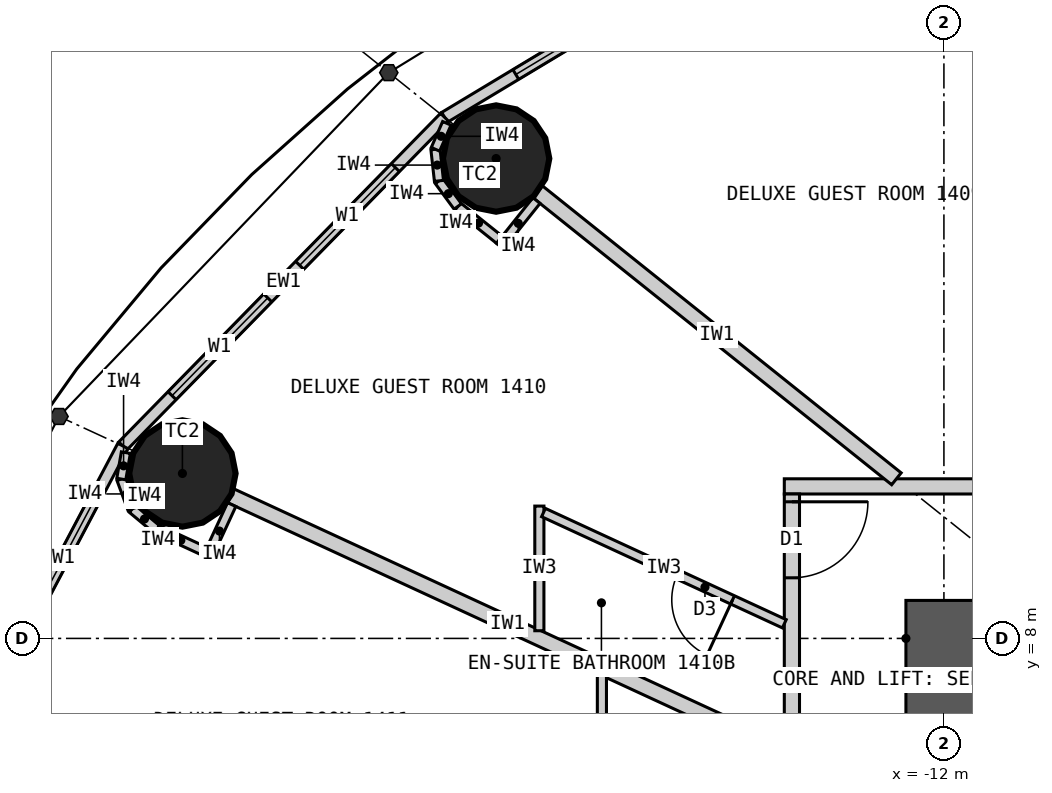
"""IFC4 building model, lengths in metres.
Left out: names, types, materials, properties, quantities, classifications, styles, units other than length and angle.
Written with IfcOpenShell. Run it as: python <this file> out.ifc"""

import sys

from ifc_helpers import new_model, si_unit, direction, frame, frame_2d, origin, origin_2d, place, context, subcontext, project, spatial, rectangle, circle, extrude, element, fill, save


model = new_model("IFC4")
c1 = context("Model", 3, precision=1e-05, world=origin(), true_north=direction((0.0, 1.0)))
c2 = subcontext(c1, "Body", "Model", "MODEL_VIEW")
j1 = project(units=[si_unit("LENGTHUNIT", "METRE"), si_unit("PLANEANGLEUNIT", "RADIAN")], contexts=[c1])
p1 = place(None, origin())
s1 = spatial("IfcSite", under=j1, at=p1, CompositionType="ELEMENT")
p2 = place(p1, origin())
s2 = spatial("IfcBuilding", under=s1, at=p2, CompositionType="ELEMENT")
p3 = place(p2, frame((0.0, 0.0, 60.6)))
s3 = spatial("IfcBuildingStorey", under=s2, at=p3, CompositionType="ELEMENT", Elevation=60.6)
for number, where, z_axis, x_axis in (
    (1, (-17.892, 14.313, 0.0), (0.0, 0.0, 1.0), (1.0, 0.0, 0.0)),
    (2, (-22.019, 10.17, 0.0), (0.0, 0.0, 1.0), (1.0, 0.0, 0.0)),
):
    element("IfcColumn", number, at=place(p3, frame(where, z_axis=z_axis, x_axis=x_axis)), inside=s3, PredefinedType="COLUMN", context=c2, shape_type="SweptSolid", body=[
        extrude(circle(Radius=0.7, at=origin_2d()), origin(), (0.0, 0.0, 1.0), 3.3),
    ])
p4 = place(p3, frame((-12.5, 8.0, 0.0), z_axis=(0.0, 0.0, 1.0), x_axis=(1.0, 0.0, 0.0)))
e3 = element("IfcWall", 3, at=p4, inside=s3, PredefinedType="SHEAR", context=c2, shape_type="SweptSolid", body=[
    extrude(rectangle(XDim=25.0, YDim=1.0, at=frame_2d((12.5, 0.0))), origin(), (0.0, 0.0, 1.0), 3.3),
])
p5 = place(p4, frame((11.2, 0.0, 0.0)))
e4 = element("IfcOpeningElement", 4, at=p5, cuts=e3, PredefinedType="OPENING", context=c2, shape_type="SweptSolid", body=[
    extrude(rectangle(XDim=1.2, YDim=2.2, at=frame_2d((0.6, 1.1))), frame((0.0, 0.51, 0.0), z_axis=(0.0, -1.0, 0.0), x_axis=(1.0, 0.0, 0.0)), (0.0, 0.0, 1.0), 1.02),
])
p6 = place(p4, frame((18.8, 0.0, 0.0)))
e5 = element("IfcOpeningElement", 5, at=p6, cuts=e3, PredefinedType="OPENING", context=c2, shape_type="SweptSolid", body=[
    extrude(rectangle(XDim=0.9, YDim=2.2, at=frame_2d((0.45, 1.1))), frame((0.0, 0.51, 0.0), z_axis=(0.0, -1.0, 0.0), x_axis=(1.0, 0.0, 0.0)), (0.0, 0.0, 1.0), 1.02),
])
p7 = place(p3, frame((-12.0, 7.5, 0.0), z_axis=(0.0, 0.0, 1.0), x_axis=(0.0, -1.0, 0.0)))
e6 = element("IfcWall", 6, at=p7, inside=s3, PredefinedType="SHEAR", context=c2, shape_type="SweptSolid", body=[
    extrude(rectangle(XDim=15.0, YDim=1.0, at=frame_2d((7.5, 0.0))), origin(), (0.0, 0.0, 1.0), 3.3),
])
p8 = place(p7, frame((6.6, 0.0, 0.0)))
e7 = element("IfcOpeningElement", 7, at=p8, cuts=e6, PredefinedType="OPENING", context=c2, shape_type="SweptSolid", body=[
    extrude(rectangle(XDim=1.8, YDim=2.2, at=frame_2d((0.9, 1.1))), frame((0.0, 0.51, 0.0), z_axis=(0.0, -1.0, 0.0), x_axis=(1.0, 0.0, 0.0)), (0.0, 0.0, 1.0), 1.02),
])
p9 = place(p3, frame((-13.096, 18.147, 0.0), z_axis=(0.0, 0.0, 1.0), x_axis=(-0.856983180864, -0.515344377787, 0.0)))
e8 = element("IfcWall", 8, at=p9, inside=s3, PredefinedType="ELEMENTEDWALL", context=c2, shape_type="SweptSolid", body=[
    extrude(rectangle(XDim=6.386, YDim=0.15, at=frame_2d((3.193, 0.0))), origin(), (0.0, 0.0, 1.0), 3.12),
])
p10 = place(p9, frame((1.093, 0.0, 0.9)))
e9 = element("IfcOpeningElement", 9, at=p10, cuts=e8, PredefinedType="OPENING", context=c2, shape_type="SweptSolid", body=[
    extrude(rectangle(XDim=1.8, YDim=1.9, at=frame_2d((0.9, 0.95))), frame((0.0, 0.085, 0.0), z_axis=(0.0, -1.0, 0.0), x_axis=(1.0, 0.0, 0.0)), (0.0, 0.0, 1.0), 0.17),
])
p11 = place(p9, frame((3.493, 0.0, 0.9)))
e10 = element("IfcOpeningElement", 10, at=p11, cuts=e8, PredefinedType="OPENING", context=c2, shape_type="SweptSolid", body=[
    extrude(rectangle(XDim=1.8, YDim=1.9, at=frame_2d((0.9, 0.95))), frame((0.0, 0.085, 0.0), z_axis=(0.0, -1.0, 0.0), x_axis=(1.0, 0.0, 0.0)), (0.0, 0.0, 1.0), 0.17),
])
p12 = place(p3, frame((-18.57, 14.856, 0.0), z_axis=(0.0, 0.0, 1.0), x_axis=(-0.699602905915, -0.714531856557, 0.0)))
e11 = element("IfcWall", 11, at=p12, inside=s3, PredefinedType="ELEMENTEDWALL", context=c2, shape_type="SweptSolid", body=[
    extrude(rectangle(XDim=6.051, YDim=0.15, at=frame_2d((3.025, 0.0))), origin(), (0.0, 0.0, 1.0), 3.12),
])
p13 = place(p12, frame((0.926, 0.0, 0.9)))
e12 = element("IfcOpeningElement", 12, at=p13, cuts=e11, PredefinedType="OPENING", context=c2, shape_type="SweptSolid", body=[
    extrude(rectangle(XDim=1.8, YDim=1.9, at=frame_2d((0.9, 0.95))), frame((0.0, 0.085, 0.0), z_axis=(0.0, -1.0, 0.0), x_axis=(1.0, 0.0, 0.0)), (0.0, 0.0, 1.0), 0.17),
])
p14 = place(p12, frame((3.325, 0.0, 0.9)))
e13 = element("IfcOpeningElement", 13, at=p14, cuts=e11, PredefinedType="OPENING", context=c2, shape_type="SweptSolid", body=[
    extrude(rectangle(XDim=1.8, YDim=1.9, at=frame_2d((0.9, 0.95))), frame((0.0, 0.085, 0.0), z_axis=(0.0, -1.0, 0.0), x_axis=(1.0, 0.0, 0.0)), (0.0, 0.0, 1.0), 0.17),
])
p15 = place(p3, frame((-22.803, 10.532, 0.0), z_axis=(0.0, 0.0, 1.0), x_axis=(-0.467296867008, -0.884100468321, 0.0)))
e14 = element("IfcWall", 14, at=p15, inside=s3, PredefinedType="ELEMENTEDWALL", context=c2, shape_type="SweptSolid", body=[
    extrude(rectangle(XDim=5.734, YDim=0.15, at=frame_2d((2.867, 0.0))), origin(), (0.0, 0.0, 1.0), 3.12),
])
p16 = place(p15, frame((0.767, 0.0, 0.9)))
e15 = element("IfcOpeningElement", 15, at=p16, cuts=e14, PredefinedType="OPENING", context=c2, shape_type="SweptSolid", body=[
    extrude(rectangle(XDim=1.8, YDim=1.9, at=frame_2d((0.9, 0.95))), frame((0.0, 0.085, 0.0), z_axis=(0.0, -1.0, 0.0), x_axis=(1.0, 0.0, 0.0)), (0.0, 0.0, 1.0), 0.17),
])
p17 = place(p15, frame((3.167, 0.0, 0.9)))
e16 = element("IfcOpeningElement", 16, at=p17, cuts=e14, PredefinedType="OPENING", context=c2, shape_type="SweptSolid", body=[
    extrude(rectangle(XDim=1.8, YDim=1.9, at=frame_2d((0.9, 0.95))), frame((0.0, 0.085, 0.0), z_axis=(0.0, -1.0, 0.0), x_axis=(1.0, 0.0, 0.0)), (0.0, 0.0, 1.0), 0.17),
])
p18 = place(p3, frame((-14.1, 10.0, 0.0), z_axis=(0.0, 0.0, 1.0), x_axis=(1.0, 0.0, 0.0)))
e17 = element("IfcWall", 17, at=p18, inside=s3, PredefinedType="PARTITIONING", context=c2, shape_type="SweptSolid", body=[
    extrude(rectangle(XDim=28.2, YDim=0.2, at=frame_2d((14.1, 0.0))), origin(), (0.0, 0.0, 1.0), 3.12),
])
p19 = place(p18, frame((18.529, 0.0, 0.0)))
e18 = element("IfcOpeningElement", 18, at=p19, cuts=e17, PredefinedType="OPENING", context=c2, shape_type="SweptSolid", body=[
    extrude(rectangle(XDim=1.0, YDim=2.2, at=frame_2d((0.5, 1.1))), frame((0.0, 0.11, 0.0), z_axis=(0.0, -1.0, 0.0), x_axis=(1.0, 0.0, 0.0)), (0.0, 0.0, 1.0), 0.22),
])
p20 = place(p18, frame((14.623, 0.0, 0.0)))
e19 = element("IfcOpeningElement", 19, at=p20, cuts=e17, PredefinedType="OPENING", context=c2, shape_type="SweptSolid", body=[
    extrude(rectangle(XDim=1.0, YDim=2.2, at=frame_2d((0.5, 1.1))), frame((0.0, 0.11, 0.0), z_axis=(0.0, -1.0, 0.0), x_axis=(1.0, 0.0, 0.0)), (0.0, 0.0, 1.0), 0.22),
])
p21 = place(p18, frame((11.24, 0.0, 0.0)))
e20 = element("IfcOpeningElement", 20, at=p21, cuts=e17, PredefinedType="OPENING", context=c2, shape_type="SweptSolid", body=[
    extrude(rectangle(XDim=1.0, YDim=2.2, at=frame_2d((0.5, 1.1))), frame((0.0, 0.11, 0.0), z_axis=(0.0, -1.0, 0.0), x_axis=(1.0, 0.0, 0.0)), (0.0, 0.0, 1.0), 0.22),
])
p22 = place(p18, frame((8.671, 0.0, 0.0)))
e21 = element("IfcOpeningElement", 21, at=p22, cuts=e17, PredefinedType="OPENING", context=c2, shape_type="SweptSolid", body=[
    extrude(rectangle(XDim=1.0, YDim=2.2, at=frame_2d((0.5, 1.1))), frame((0.0, 0.11, 0.0), z_axis=(0.0, -1.0, 0.0), x_axis=(1.0, 0.0, 0.0)), (0.0, 0.0, 1.0), 0.22),
])
p23 = place(p18, frame((2.801, 0.0, 0.0)))
e22 = element("IfcOpeningElement", 22, at=p23, cuts=e17, PredefinedType="OPENING", context=c2, shape_type="SweptSolid", body=[
    extrude(rectangle(XDim=1.0, YDim=2.2, at=frame_2d((0.5, 1.1))), frame((0.0, 0.11, 0.0), z_axis=(0.0, -1.0, 0.0), x_axis=(1.0, 0.0, 0.0)), (0.0, 0.0, 1.0), 0.22),
])
p24 = place(p3, frame((-14.0, 9.9, 0.0), z_axis=(0.0, 0.0, 1.0), x_axis=(0.0, -1.0, 0.0)))
e23 = element("IfcWall", 23, at=p24, inside=s3, PredefinedType="PARTITIONING", context=c2, shape_type="SweptSolid", body=[
    extrude(rectangle(XDim=19.8, YDim=0.2, at=frame_2d((9.9, 0.0))), origin(), (0.0, 0.0, 1.0), 3.12),
])
p25 = place(p24, frame((0.103, 0.0, 0.0)))
e24 = element("IfcOpeningElement", 24, at=p25, cuts=e23, PredefinedType="OPENING", context=c2, shape_type="SweptSolid", body=[
    extrude(rectangle(XDim=1.0, YDim=2.2, at=frame_2d((0.5, 1.1))), frame((0.0, 0.11, 0.0), z_axis=(0.0, -1.0, 0.0), x_axis=(1.0, 0.0, 0.0)), (0.0, 0.0, 1.0), 0.22),
])
p26 = place(p24, frame((5.248, 0.0, 0.0)))
e25 = element("IfcOpeningElement", 25, at=p26, cuts=e23, PredefinedType="OPENING", context=c2, shape_type="SweptSolid", body=[
    extrude(rectangle(XDim=1.0, YDim=2.2, at=frame_2d((0.5, 1.1))), frame((0.0, 0.11, 0.0), z_axis=(0.0, -1.0, 0.0), x_axis=(1.0, 0.0, 0.0)), (0.0, 0.0, 1.0), 0.22),
])
p27 = place(p24, frame((9.438, 0.0, 0.0)))
e26 = element("IfcOpeningElement", 26, at=p27, cuts=e23, PredefinedType="OPENING", context=c2, shape_type="SweptSolid", body=[
    extrude(rectangle(XDim=1.0, YDim=2.2, at=frame_2d((0.5, 1.1))), frame((0.0, 0.11, 0.0), z_axis=(0.0, -1.0, 0.0), x_axis=(1.0, 0.0, 0.0)), (0.0, 0.0, 1.0), 0.22),
])
p28 = place(p24, frame((13.942, 0.0, 0.0)))
e27 = element("IfcOpeningElement", 27, at=p28, cuts=e23, PredefinedType="OPENING", context=c2, shape_type="SweptSolid", body=[
    extrude(rectangle(XDim=1.0, YDim=2.2, at=frame_2d((0.5, 1.1))), frame((0.0, 0.11, 0.0), z_axis=(0.0, -1.0, 0.0), x_axis=(1.0, 0.0, 0.0)), (0.0, 0.0, 1.0), 0.22),
])
p29 = place(p24, frame((18.698, 0.0, 0.0)))
e28 = element("IfcOpeningElement", 28, at=p29, cuts=e23, PredefinedType="OPENING", context=c2, shape_type="SweptSolid", body=[
    extrude(rectangle(XDim=1.0, YDim=2.2, at=frame_2d((0.5, 1.1))), frame((0.0, 0.11, 0.0), z_axis=(0.0, -1.0, 0.0), x_axis=(1.0, 0.0, 0.0)), (0.0, 0.0, 1.0), 0.22),
])
p30 = place(p3, frame((-7.289, 10.1, 0.0), z_axis=(0.0, 0.0, 1.0), x_axis=(-0.585198353053, 0.810890182197, 0.0)))
e29 = element("IfcWall", 29, at=p30, inside=s3, PredefinedType="PARTITIONING", context=c2, shape_type="SweptSolid", body=[
    extrude(rectangle(XDim=8.36, YDim=0.2, at=frame_2d((4.18, 0.0))), origin(), (0.0, 0.0, 1.0), 2.32),
])
p31 = place(p3, frame((-12.625, 10.1, 0.0), z_axis=(0.0, 0.0, 1.0), x_axis=(-0.780892451574, 0.624665493744, 0.0)))
e30 = element("IfcWall", 30, at=p31, inside=s3, PredefinedType="PARTITIONING", context=c2, shape_type="SweptSolid", body=[
    extrude(rectangle(XDim=6.045, YDim=0.2, at=frame_2d((3.022, 0.0))), origin(), (0.0, 0.0, 1.0), 2.32),
])
p32 = place(p3, frame((-14.1, 6.512, 0.0), z_axis=(0.0, 0.0, 1.0), x_axis=(-0.907832871056, 0.419332181247, 0.0)))
e31 = element("IfcWall", 31, at=p32, inside=s3, PredefinedType="PARTITIONING", context=c2, shape_type="SweptSolid", body=[
    extrude(rectangle(XDim=8.023, YDim=0.2, at=frame_2d((4.011, 0.0))), origin(), (0.0, 0.0, 1.0), 2.32),
])
p33 = place(p3, frame((-17.323, 8.101, 0.0), z_axis=(0.0, 0.0, 1.0), x_axis=(0.0, 1.0, 0.0)))
e32 = element("IfcWall", 32, at=p33, inside=s3, PredefinedType="PARTITIONING", context=c2, shape_type="SweptSolid", body=[
    extrude(rectangle(XDim=1.64, YDim=0.12, at=frame_2d((0.82, 0.0))), origin(), (0.0, 0.0, 1.0), 3.12),
])
p34 = place(p3, frame((-14.1, 8.193, 0.0), z_axis=(0.0, 0.0, 1.0), x_axis=(-0.907836493557, 0.419324338628, 0.0)))
e33 = element("IfcWall", 33, at=p34, inside=s3, PredefinedType="PARTITIONING", context=c2, shape_type="SweptSolid", body=[
    extrude(rectangle(XDim=3.49, YDim=0.12, at=frame_2d((1.745, 0.0))), origin(), (0.0, 0.0, 1.0), 3.12),
])
p35 = place(p34, frame((0.75, 0.0, 0.0)))
e34 = element("IfcOpeningElement", 34, at=p35, cuts=e33, PredefinedType="OPENING", context=c2, shape_type="SweptSolid", body=[
    extrude(rectangle(XDim=0.8, YDim=2.1, at=frame_2d((0.4, 1.05))), frame((0.0, 0.07, 0.0), z_axis=(0.0, -1.0, 0.0), x_axis=(1.0, 0.0, 0.0)), (0.0, 0.0, 1.0), 0.14),
])
p36 = place(p3, frame((-16.5, 7.521, 0.0), z_axis=(0.0, 0.0, 1.0), x_axis=(0.0, -1.0, 0.0)))
e35 = element("IfcWall", 35, at=p36, inside=s3, PredefinedType="PARTITIONING", context=c2, shape_type="SweptSolid", body=[
    extrude(rectangle(XDim=2.749, YDim=0.12, at=frame_2d((1.374, 0.0))), origin(), (0.0, 0.0, 1.0), 3.12),
])
p37 = place(p3, frame((-17.361, 13.76, 0.0), z_axis=(0.0, 0.0, 1.0), x_axis=(-0.624501042889, -0.781023973659, 0.0)))
e36 = element("IfcWall", 36, at=p37, inside=s3, PredefinedType="PARTITIONING", context=c2, shape_type="SweptSolid", body=[
    extrude(rectangle(XDim=0.767, YDim=0.12, at=frame_2d((0.384, 0.0))), origin(), (0.0, 0.0, 1.0), 3.12),
])
p38 = place(p3, frame((-17.85, 13.246, 0.0), z_axis=(0.0, 0.0, 1.0), x_axis=(-0.780902834923, 0.62465251333, 0.0)))
e37 = element("IfcWall", 37, at=p38, inside=s3, PredefinedType="PARTITIONING", context=c2, shape_type="SweptSolid", body=[
    extrude(rectangle(XDim=0.7, YDim=0.12, at=frame_2d((0.35, 0.0))), origin(), (0.0, 0.0, 1.0), 3.12),
])
for number, where, z_axis, x_axis in (
    (38, (-18.396, 13.683, 0.0), (0.0, 0.0, 1.0), (-0.592, 0.806, 0.0)),
    (39, (-18.644, 14.02, 0.0), (0.0, 0.0, 1.0), (-0.11, 0.994, 0.0)),
):
    element("IfcWall", number, at=place(p3, frame(where, z_axis=z_axis, x_axis=x_axis)), inside=s3, PredefinedType="PARTITIONING", context=c2, shape_type="SweptSolid", body=[
        extrude(rectangle(XDim=0.418, YDim=0.12, at=frame_2d((0.209, 0.0))), origin(), (0.0, 0.0, 1.0), 3.12),
    ])
p39 = place(p3, frame((-18.69, 14.435, 0.0), z_axis=(0.0, 0.0, 1.0), x_axis=(0.401093412634, 0.91603715773, 0.0)))
e40 = element("IfcWall", 40, at=p39, inside=s3, PredefinedType="PARTITIONING", context=c2, shape_type="SweptSolid", body=[
    extrude(rectangle(XDim=0.373, YDim=0.12, at=frame_2d((0.187, 0.0))), origin(), (0.0, 0.0, 1.0), 3.12),
])
p40 = place(p3, frame((-21.371, 9.761, 0.0), z_axis=(0.0, 0.0, 1.0), x_axis=(-0.419259891039, -0.907866258744, 0.0)))
e41 = element("IfcWall", 41, at=p40, inside=s3, PredefinedType="PARTITIONING", context=c2, shape_type="SweptSolid", body=[
    extrude(rectangle(XDim=0.768, YDim=0.12, at=frame_2d((0.384, 0.0))), origin(), (0.0, 0.0, 1.0), 3.12),
])
p41 = place(p3, frame((-21.722, 9.144, 0.0), z_axis=(0.0, 0.0, 1.0), x_axis=(-0.907877701396, 0.419235112208, 0.0)))
e42 = element("IfcWall", 42, at=p41, inside=s3, PredefinedType="PARTITIONING", context=c2, shape_type="SweptSolid", body=[
    extrude(rectangle(XDim=0.7, YDim=0.12, at=frame_2d((0.35, 0.0))), origin(), (0.0, 0.0, 1.0), 3.12),
])
p42 = place(p3, frame((-22.358, 9.437, 0.0), z_axis=(0.0, 0.0, 1.0), x_axis=(-0.768412687942, 0.639954639806, 0.0)))
e43 = element("IfcWall", 43, at=p42, inside=s3, PredefinedType="PARTITIONING", context=c2, shape_type="SweptSolid", body=[
    extrude(rectangle(XDim=0.418, YDim=0.12, at=frame_2d((0.209, 0.0))), origin(), (0.0, 0.0, 1.0), 3.12),
])
p43 = place(p3, frame((-22.679, 9.705, 0.0), z_axis=(0.0, 0.0, 1.0), x_axis=(-0.345164001646, 0.938542386879, 0.0)))
e44 = element("IfcWall", 44, at=p43, inside=s3, PredefinedType="PARTITIONING", context=c2, shape_type="SweptSolid", body=[
    extrude(rectangle(XDim=0.418, YDim=0.12, at=frame_2d((0.209, 0.0))), origin(), (0.0, 0.0, 1.0), 3.12),
])
p44 = place(p3, frame((-22.823, 10.097, 0.0), z_axis=(0.0, 0.0, 1.0), x_axis=(0.169674995186, 0.985500074079, 0.0)))
e45 = element("IfcWall", 45, at=p44, inside=s3, PredefinedType="PARTITIONING", context=c2, shape_type="SweptSolid", body=[
    extrude(rectangle(XDim=0.353, YDim=0.12, at=frame_2d((0.176, 0.0))), origin(), (0.0, 0.0, 1.0), 3.12),
])
p45 = place(p11, origin())
e46 = element("IfcWindow", 46, at=p45, inside=s3, PartitioningType="SINGLE_PANEL", PredefinedType="WINDOW", context=c2, shape_type="SweptSolid", body=[
    extrude(rectangle(XDim=1.8, YDim=1.9, at=frame_2d((0.9, 0.95))), frame((0.0, 0.03, 0.0), z_axis=(0.0, -1.0, 0.0), x_axis=(1.0, 0.0, 0.0)), (0.0, 0.0, 1.0), 0.06),
])
fill(e10, e46)
p46 = place(p13, origin())
e47 = element("IfcWindow", 47, at=p46, inside=s3, PartitioningType="SINGLE_PANEL", PredefinedType="WINDOW", context=c2, shape_type="SweptSolid", body=[
    extrude(rectangle(XDim=1.8, YDim=1.9, at=frame_2d((0.9, 0.95))), frame((0.0, 0.03, 0.0), z_axis=(0.0, -1.0, 0.0), x_axis=(1.0, 0.0, 0.0)), (0.0, 0.0, 1.0), 0.06),
])
fill(e12, e47)
p47 = place(p14, origin())
e48 = element("IfcWindow", 48, at=p47, inside=s3, PartitioningType="SINGLE_PANEL", PredefinedType="WINDOW", context=c2, shape_type="SweptSolid", body=[
    extrude(rectangle(XDim=1.8, YDim=1.9, at=frame_2d((0.9, 0.95))), frame((0.0, 0.03, 0.0), z_axis=(0.0, -1.0, 0.0), x_axis=(1.0, 0.0, 0.0)), (0.0, 0.0, 1.0), 0.06),
])
fill(e13, e48)
p48 = place(p16, origin())
e49 = element("IfcWindow", 49, at=p48, inside=s3, PartitioningType="SINGLE_PANEL", PredefinedType="WINDOW", context=c2, shape_type="SweptSolid", body=[
    extrude(rectangle(XDim=1.8, YDim=1.9, at=frame_2d((0.9, 0.95))), frame((0.0, 0.03, 0.0), z_axis=(0.0, -1.0, 0.0), x_axis=(1.0, 0.0, 0.0)), (0.0, 0.0, 1.0), 0.06),
])
fill(e15, e49)
p49 = place(p35, origin())
e50 = element("IfcDoor", 50, at=p49, inside=s3, OperationType="SINGLE_SWING_LEFT", PredefinedType="DOOR", context=c2, shape_type="SweptSolid", body=[
    extrude(rectangle(XDim=0.8, YDim=2.1, at=frame_2d((0.4, 1.05))), frame((0.0, 0.025, 0.0), z_axis=(0.0, -1.0, 0.0), x_axis=(1.0, 0.0, 0.0)), (0.0, 0.0, 1.0), 0.05),
])
fill(e34, e50)
p50 = place(p25, origin())
e51 = element("IfcDoor", 51, at=p50, inside=s3, OperationType="SINGLE_SWING_LEFT", PredefinedType="DOOR", context=c2, shape_type="SweptSolid", body=[
    extrude(rectangle(XDim=1.0, YDim=2.2, at=frame_2d((0.5, 1.1))), frame((0.0, 0.025, 0.0), z_axis=(0.0, -1.0, 0.0), x_axis=(1.0, 0.0, 0.0)), (0.0, 0.0, 1.0), 0.05),
])
fill(e24, e51)
save(model, sys.argv[1])
